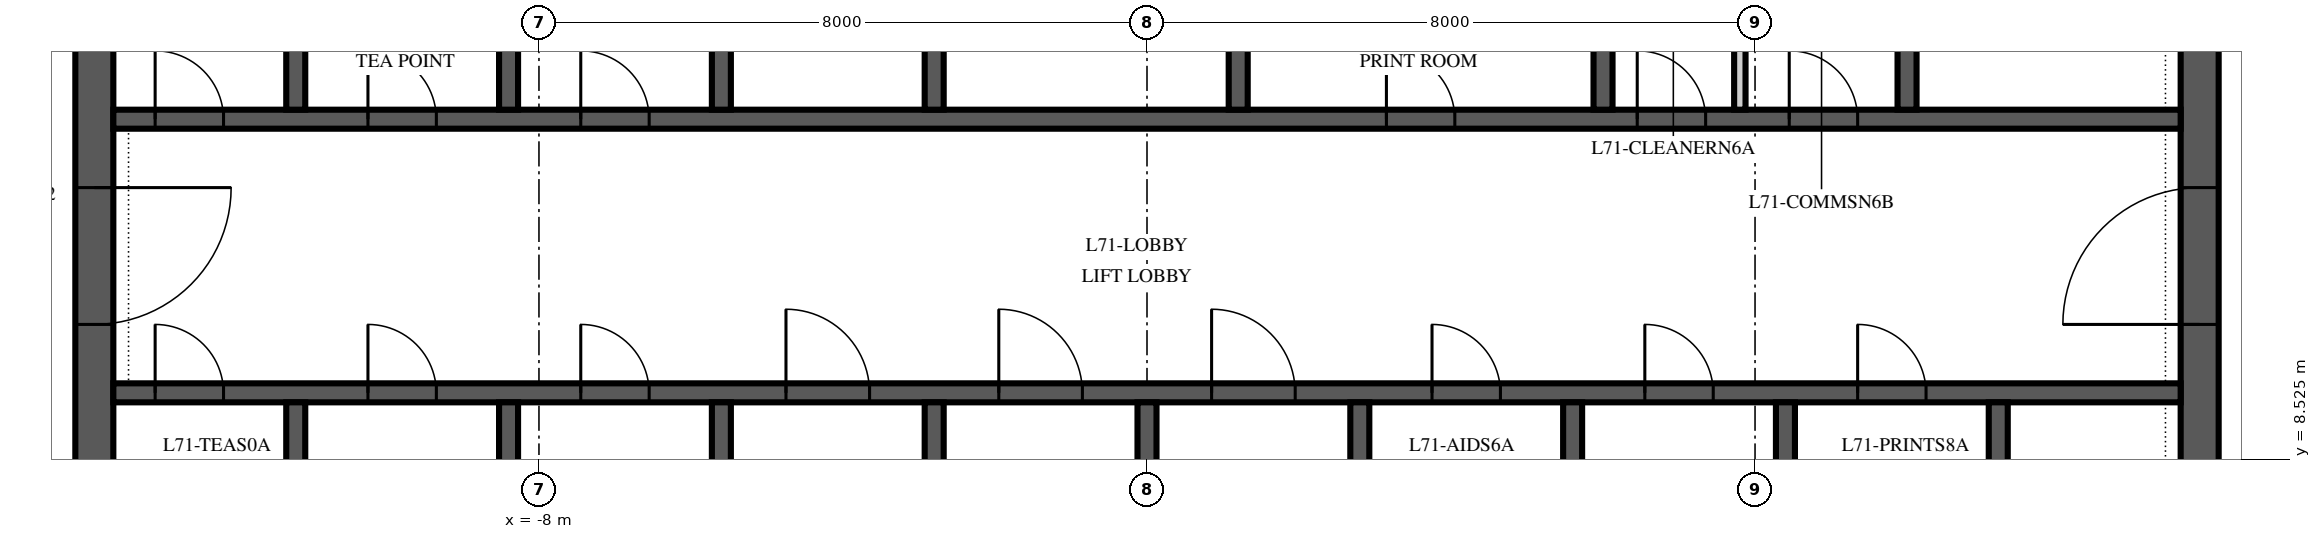
"""IFC4 building model, lengths in metres.
Left out: names, types, materials, properties, quantities, classifications, styles, units other than length and angle.
Written with IfcOpenShell. Run it as: python <this file> out.ifc"""

import sys

from ifc_helpers import new_model, si_unit, direction, frame, frame_2d, origin, place, context, subcontext, project, spatial, polyline, rectangle, outline, extrude, element, fill, save


model = new_model("IFC4")
c1 = context("Model", 3, precision=1e-05, world=origin(), true_north=direction((0.0, 1.0)))
c2 = subcontext(c1, "Body", "Model", "MODEL_VIEW")
j1 = project(units=[si_unit("LENGTHUNIT", "METRE"), si_unit("PLANEANGLEUNIT", "RADIAN")], contexts=[c1])
p1 = place(None, origin())
s1 = spatial("IfcSite", under=j1, at=p1, CompositionType="ELEMENT")
p2 = place(p1, origin())
s2 = spatial("IfcBuilding", under=s1, at=p2, CompositionType="ELEMENT")
p3 = place(p2, frame((0.0, 0.0, 304.0)))
s3 = spatial("IfcBuildingStorey", under=s2, at=p3, CompositionType="ELEMENT", Elevation=304.0)
p4 = place(p3, frame((13.85, 6.15, 0.0), z_axis=(0.0, 0.0, 1.0), x_axis=(0.0, 1.0, 0.0)))
e1 = element("IfcWall", 1, at=p4, inside=s3, PredefinedType="SHEAR", context=c2, shape_type="SweptSolid", body=[
    extrude(outline(polyline([(0.0, -0.25), (17.7, -0.25), (17.7, 0.0), (17.45, 0.0), (17.45, 0.25), (0.25, 0.25), (0.25, 0.0), (0.0, 0.0), (0.0, -0.25)])), origin(), (0.0, 0.0, 1.0), 4.0),
])
p5 = place(p4, frame((4.15, 0.0, 0.0)))
e2 = element("IfcOpeningElement", 2, at=p5, cuts=e1, PredefinedType="OPENING", context=c2, shape_type="SweptSolid", body=[
    extrude(rectangle(XDim=1.8, YDim=2.4, at=frame_2d((0.9, 1.2))), frame((0.0, 0.265, 0.0), z_axis=(0.0, -1.0, 0.0), x_axis=(1.0, 0.0, 0.0)), (0.0, 0.0, 1.0), 0.53),
])
p6 = place(p3, frame((-13.85, 23.85, 0.0), z_axis=(0.0, 0.0, 1.0), x_axis=(0.0, -1.0, 0.0)))
e3 = element("IfcWall", 3, at=p6, inside=s3, PredefinedType="SHEAR", context=c2, shape_type="SweptSolid", body=[
    extrude(outline(polyline([(0.0, -0.25), (17.7, -0.25), (17.7, 0.0), (17.45, 0.0), (17.45, 0.25), (0.25, 0.25), (0.25, 0.0), (0.0, 0.0), (0.0, -0.25)])), origin(), (0.0, 0.0, 1.0), 4.0),
])
p7 = place(p6, frame((11.75, 0.0, 0.0)))
e4 = element("IfcOpeningElement", 4, at=p7, cuts=e3, PredefinedType="OPENING", context=c2, shape_type="SweptSolid", body=[
    extrude(rectangle(XDim=1.8, YDim=2.4, at=frame_2d((0.9, 1.2))), frame((0.0, 0.265, 0.0), z_axis=(0.0, -1.0, 0.0), x_axis=(1.0, 0.0, 0.0)), (0.0, 0.0, 1.0), 0.53),
])
p8 = place(p3, frame((-13.6, 9.4, 0.0), z_axis=(0.0, 0.0, 1.0), x_axis=(1.0, 0.0, 0.0)))
e5 = element("IfcWall", 5, at=p8, inside=s3, PredefinedType="SHEAR", context=c2, shape_type="SweptSolid", body=[
    extrude(rectangle(XDim=27.2, YDim=0.25, at=frame_2d((13.6, 0.0))), origin(), (0.0, 0.0, 1.0), 4.0),
])
p9 = place(p8, frame((8.85, 0.0, 0.0)))
e6 = element("IfcOpeningElement", 6, at=p9, cuts=e5, PredefinedType="OPENING", context=c2, shape_type="SweptSolid", body=[
    extrude(rectangle(XDim=1.1, YDim=2.1, at=frame_2d((0.55, 1.05))), frame((0.0, 0.14, 0.0), z_axis=(0.0, -1.0, 0.0), x_axis=(1.0, 0.0, 0.0)), (0.0, 0.0, 1.0), 0.28),
])
p10 = place(p8, frame((11.65, 0.0, 0.0)))
e7 = element("IfcOpeningElement", 7, at=p10, cuts=e5, PredefinedType="OPENING", context=c2, shape_type="SweptSolid", body=[
    extrude(rectangle(XDim=1.1, YDim=2.1, at=frame_2d((0.55, 1.05))), frame((0.0, 0.14, 0.0), z_axis=(0.0, -1.0, 0.0), x_axis=(1.0, 0.0, 0.0)), (0.0, 0.0, 1.0), 0.28),
])
p11 = place(p8, frame((14.45, 0.0, 0.0)))
e8 = element("IfcOpeningElement", 8, at=p11, cuts=e5, PredefinedType="OPENING", context=c2, shape_type="SweptSolid", body=[
    extrude(rectangle(XDim=1.1, YDim=2.1, at=frame_2d((0.55, 1.05))), frame((0.0, 0.14, 0.0), z_axis=(0.0, -1.0, 0.0), x_axis=(1.0, 0.0, 0.0)), (0.0, 0.0, 1.0), 0.28),
])
p12 = place(p8, frame((0.55, 0.0, 0.0)))
e9 = element("IfcOpeningElement", 9, at=p12, cuts=e5, PredefinedType="OPENING", context=c2, shape_type="SweptSolid", body=[
    extrude(rectangle(XDim=0.9, YDim=2.1, at=frame_2d((0.45, 1.05))), frame((0.0, 0.14, 0.0), z_axis=(0.0, -1.0, 0.0), x_axis=(1.0, 0.0, 0.0)), (0.0, 0.0, 1.0), 0.28),
])
p13 = place(p8, frame((3.35, 0.0, 0.0)))
e10 = element("IfcOpeningElement", 10, at=p13, cuts=e5, PredefinedType="OPENING", context=c2, shape_type="SweptSolid", body=[
    extrude(rectangle(XDim=0.9, YDim=2.1, at=frame_2d((0.45, 1.05))), frame((0.0, 0.14, 0.0), z_axis=(0.0, -1.0, 0.0), x_axis=(1.0, 0.0, 0.0)), (0.0, 0.0, 1.0), 0.28),
])
p14 = place(p8, frame((6.15, 0.0, 0.0)))
e11 = element("IfcOpeningElement", 11, at=p14, cuts=e5, PredefinedType="OPENING", context=c2, shape_type="SweptSolid", body=[
    extrude(rectangle(XDim=0.9, YDim=2.1, at=frame_2d((0.45, 1.05))), frame((0.0, 0.14, 0.0), z_axis=(0.0, -1.0, 0.0), x_axis=(1.0, 0.0, 0.0)), (0.0, 0.0, 1.0), 0.28),
])
p15 = place(p8, frame((17.35, 0.0, 0.0)))
e12 = element("IfcOpeningElement", 12, at=p15, cuts=e5, PredefinedType="OPENING", context=c2, shape_type="SweptSolid", body=[
    extrude(rectangle(XDim=0.9, YDim=2.1, at=frame_2d((0.45, 1.05))), frame((0.0, 0.14, 0.0), z_axis=(0.0, -1.0, 0.0), x_axis=(1.0, 0.0, 0.0)), (0.0, 0.0, 1.0), 0.28),
])
p16 = place(p8, frame((20.15, 0.0, 0.0)))
e13 = element("IfcOpeningElement", 13, at=p16, cuts=e5, PredefinedType="OPENING", context=c2, shape_type="SweptSolid", body=[
    extrude(rectangle(XDim=0.9, YDim=2.1, at=frame_2d((0.45, 1.05))), frame((0.0, 0.14, 0.0), z_axis=(0.0, -1.0, 0.0), x_axis=(1.0, 0.0, 0.0)), (0.0, 0.0, 1.0), 0.28),
])
p17 = place(p8, frame((22.95, 0.0, 0.0)))
e14 = element("IfcOpeningElement", 14, at=p17, cuts=e5, PredefinedType="OPENING", context=c2, shape_type="SweptSolid", body=[
    extrude(rectangle(XDim=0.9, YDim=2.1, at=frame_2d((0.45, 1.05))), frame((0.0, 0.14, 0.0), z_axis=(0.0, -1.0, 0.0), x_axis=(1.0, 0.0, 0.0)), (0.0, 0.0, 1.0), 0.28),
])
p18 = place(p3, frame((-13.6, 13.0, 0.0), z_axis=(0.0, 0.0, 1.0), x_axis=(1.0, 0.0, 0.0)))
e15 = element("IfcWall", 15, at=p18, inside=s3, PredefinedType="SHEAR", context=c2, shape_type="SweptSolid", body=[
    extrude(rectangle(XDim=27.2, YDim=0.25, at=frame_2d((13.6, 0.0))), origin(), (0.0, 0.0, 1.0), 4.0),
])
p19 = place(p18, frame((16.75, 0.0, 0.0)))
e16 = element("IfcOpeningElement", 16, at=p19, cuts=e15, PredefinedType="OPENING", context=c2, shape_type="SweptSolid", body=[
    extrude(rectangle(XDim=0.9, YDim=2.1, at=frame_2d((0.45, 1.05))), frame((0.0, 0.14, 0.0), z_axis=(0.0, -1.0, 0.0), x_axis=(1.0, 0.0, 0.0)), (0.0, 0.0, 1.0), 0.28),
])
p20 = place(p18, frame((20.05, 0.0, 0.0)))
e17 = element("IfcOpeningElement", 17, at=p20, cuts=e15, PredefinedType="OPENING", context=c2, shape_type="SweptSolid", body=[
    extrude(rectangle(XDim=0.9, YDim=2.1, at=frame_2d((0.45, 1.05))), frame((0.0, 0.14, 0.0), z_axis=(0.0, -1.0, 0.0), x_axis=(1.0, 0.0, 0.0)), (0.0, 0.0, 1.0), 0.28),
])
p21 = place(p18, frame((22.05, 0.0, 0.0)))
e18 = element("IfcOpeningElement", 18, at=p21, cuts=e15, PredefinedType="OPENING", context=c2, shape_type="SweptSolid", body=[
    extrude(rectangle(XDim=0.9, YDim=2.1, at=frame_2d((0.45, 1.05))), frame((0.0, 0.14, 0.0), z_axis=(0.0, -1.0, 0.0), x_axis=(1.0, 0.0, 0.0)), (0.0, 0.0, 1.0), 0.28),
])
p22 = place(p18, frame((0.55, 0.0, 0.0)))
e19 = element("IfcOpeningElement", 19, at=p22, cuts=e15, PredefinedType="OPENING", context=c2, shape_type="SweptSolid", body=[
    extrude(rectangle(XDim=0.9, YDim=2.1, at=frame_2d((0.45, 1.05))), frame((0.0, 0.14, 0.0), z_axis=(0.0, -1.0, 0.0), x_axis=(1.0, 0.0, 0.0)), (0.0, 0.0, 1.0), 0.28),
])
p23 = place(p18, frame((3.35, 0.0, 0.0)))
e20 = element("IfcOpeningElement", 20, at=p23, cuts=e15, PredefinedType="OPENING", context=c2, shape_type="SweptSolid", body=[
    extrude(rectangle(XDim=0.9, YDim=2.1, at=frame_2d((0.45, 1.05))), frame((0.0, 0.14, 0.0), z_axis=(0.0, -1.0, 0.0), x_axis=(1.0, 0.0, 0.0)), (0.0, 0.0, 1.0), 0.28),
])
p24 = place(p18, frame((6.15, 0.0, 0.0)))
e21 = element("IfcOpeningElement", 21, at=p24, cuts=e15, PredefinedType="OPENING", context=c2, shape_type="SweptSolid", body=[
    extrude(rectangle(XDim=0.9, YDim=2.1, at=frame_2d((0.45, 1.05))), frame((0.0, 0.14, 0.0), z_axis=(0.0, -1.0, 0.0), x_axis=(1.0, 0.0, 0.0)), (0.0, 0.0, 1.0), 0.28),
])
for number, where, z_axis, x_axis in (
    (22, (-11.2, 6.4, 0.0), (0.0, 0.0, 1.0), (0.0, 1.0, 0.0)),
    (23, (-8.4, 6.4, 0.0), (0.0, 0.0, 1.0), (0.0, 1.0, 0.0)),
    (24, (-5.6, 6.4, 0.0), (0.0, 0.0, 1.0), (0.0, 1.0, 0.0)),
    (25, (-2.8, 6.4, 0.0), (0.0, 0.0, 1.0), (0.0, 1.0, 0.0)),
    (26, (0.0, 6.4, 0.0), (0.0, 0.0, 1.0), (0.0, 1.0, 0.0)),
    (27, (2.8, 6.4, 0.0), (0.0, 0.0, 1.0), (0.0, 1.0, 0.0)),
    (28, (5.6, 6.4, 0.0), (0.0, 0.0, 1.0), (0.0, 1.0, 0.0)),
    (29, (8.4, 6.4, 0.0), (0.0, 0.0, 1.0), (0.0, 1.0, 0.0)),
    (30, (11.2, 6.4, 0.0), (0.0, 0.0, 1.0), (0.0, 1.0, 0.0)),
):
    element("IfcWall", number, at=place(p3, frame(where, z_axis=z_axis, x_axis=x_axis)), inside=s3, PredefinedType="SHEAR", context=c2, shape_type="SweptSolid", body=[
        extrude(rectangle(XDim=2.875, YDim=0.25, at=frame_2d((1.438, 0.0))), origin(), (0.0, 0.0, 1.0), 4.0),
    ])
for number, where, z_axis, x_axis in (
    (31, (-11.2, 13.125, 0.0), (0.0, 0.0, 1.0), (0.0, 1.0, 0.0)),
    (32, (-8.4, 13.125, 0.0), (0.0, 0.0, 1.0), (0.0, 1.0, 0.0)),
    (33, (-5.6, 13.125, 0.0), (0.0, 0.0, 1.0), (0.0, 1.0, 0.0)),
    (34, (-2.8, 13.125, 0.0), (0.0, 0.0, 1.0), (0.0, 1.0, 0.0)),
    (35, (1.2, 13.125, 0.0), (0.0, 0.0, 1.0), (0.0, 1.0, 0.0)),
    (36, (6.0, 13.125, 0.0), (0.0, 0.0, 1.0), (0.0, 1.0, 0.0)),
    (37, (10.0, 13.125, 0.0), (0.0, 0.0, 1.0), (0.0, 1.0, 0.0)),
):
    element("IfcWall", number, at=place(p3, frame(where, z_axis=z_axis, x_axis=x_axis)), inside=s3, PredefinedType="SHEAR", context=c2, shape_type="SweptSolid", body=[
        extrude(rectangle(XDim=2.75, YDim=0.25, at=frame_2d((1.375, 0.0))), origin(), (0.0, 0.0, 1.0), 4.0),
    ])
p25 = place(p3, frame((7.8, 13.125, 0.0), z_axis=(0.0, 0.0, 1.0), x_axis=(0.0, 1.0, 0.0)))
e38 = element("IfcWall", 38, at=p25, inside=s3, PredefinedType="PARTITIONING", context=c2, shape_type="SweptSolid", body=[
    extrude(rectangle(XDim=2.75, YDim=0.15, at=frame_2d((1.375, 0.0))), origin(), (0.0, 0.0, 1.0), 3.85),
])
p26 = place(p5, origin())
e39 = element("IfcDoor", 39, at=p26, inside=s3, OperationType="DOUBLE_DOOR_SINGLE_SWING", PredefinedType="DOOR", context=c2, shape_type="SweptSolid", body=[
    extrude(rectangle(XDim=1.8, YDim=2.4, at=frame_2d((0.9, 1.2))), frame((0.0, 0.25, 0.0), z_axis=(0.0, -1.0, 0.0), x_axis=(1.0, 0.0, 0.0)), (0.0, 0.0, 1.0), 0.5),
])
fill(e2, e39)
p27 = place(p7, origin())
e40 = element("IfcDoor", 40, at=p27, inside=s3, OperationType="DOUBLE_DOOR_SINGLE_SWING", PredefinedType="DOOR", context=c2, shape_type="SweptSolid", body=[
    extrude(rectangle(XDim=1.8, YDim=2.4, at=frame_2d((0.9, 1.2))), frame((0.0, 0.25, 0.0), z_axis=(0.0, -1.0, 0.0), x_axis=(1.0, 0.0, 0.0)), (0.0, 0.0, 1.0), 0.5),
])
fill(e4, e40)
p28 = place(p9, origin())
e41 = element("IfcDoor", 41, at=p28, inside=s3, OperationType="SLIDING_TO_LEFT", PredefinedType="DOOR", context=c2, shape_type="SweptSolid", body=[
    extrude(rectangle(XDim=1.1, YDim=2.1, at=frame_2d((0.55, 1.05))), frame((0.0, 0.125, 0.0), z_axis=(0.0, -1.0, 0.0), x_axis=(1.0, 0.0, 0.0)), (0.0, 0.0, 1.0), 0.25),
])
fill(e6, e41)
p29 = place(p10, origin())
e42 = element("IfcDoor", 42, at=p29, inside=s3, OperationType="SLIDING_TO_LEFT", PredefinedType="DOOR", context=c2, shape_type="SweptSolid", body=[
    extrude(rectangle(XDim=1.1, YDim=2.1, at=frame_2d((0.55, 1.05))), frame((0.0, 0.125, 0.0), z_axis=(0.0, -1.0, 0.0), x_axis=(1.0, 0.0, 0.0)), (0.0, 0.0, 1.0), 0.25),
])
fill(e7, e42)
p30 = place(p11, origin())
e43 = element("IfcDoor", 43, at=p30, inside=s3, OperationType="SLIDING_TO_LEFT", PredefinedType="DOOR", context=c2, shape_type="SweptSolid", body=[
    extrude(rectangle(XDim=1.1, YDim=2.1, at=frame_2d((0.55, 1.05))), frame((0.0, 0.125, 0.0), z_axis=(0.0, -1.0, 0.0), x_axis=(1.0, 0.0, 0.0)), (0.0, 0.0, 1.0), 0.25),
])
fill(e8, e43)
p31 = place(p19, origin())
e44 = element("IfcDoor", 44, at=p31, inside=s3, OperationType="SINGLE_SWING_LEFT", PredefinedType="DOOR", context=c2, shape_type="SweptSolid", body=[
    extrude(rectangle(XDim=0.9, YDim=2.1, at=frame_2d((0.45, 1.05))), frame((0.0, 0.125, 0.0), z_axis=(0.0, -1.0, 0.0), x_axis=(1.0, 0.0, 0.0)), (0.0, 0.0, 1.0), 0.25),
])
fill(e16, e44)
p32 = place(p20, origin())
e45 = element("IfcDoor", 45, at=p32, inside=s3, OperationType="SINGLE_SWING_LEFT", PredefinedType="DOOR", context=c2, shape_type="SweptSolid", body=[
    extrude(rectangle(XDim=0.9, YDim=2.1, at=frame_2d((0.45, 1.05))), frame((0.0, 0.125, 0.0), z_axis=(0.0, -1.0, 0.0), x_axis=(1.0, 0.0, 0.0)), (0.0, 0.0, 1.0), 0.25),
])
fill(e17, e45)
p33 = place(p21, origin())
e46 = element("IfcDoor", 46, at=p33, inside=s3, OperationType="SINGLE_SWING_LEFT", PredefinedType="DOOR", context=c2, shape_type="SweptSolid", body=[
    extrude(rectangle(XDim=0.9, YDim=2.1, at=frame_2d((0.45, 1.05))), frame((0.0, 0.125, 0.0), z_axis=(0.0, -1.0, 0.0), x_axis=(1.0, 0.0, 0.0)), (0.0, 0.0, 1.0), 0.25),
])
fill(e18, e46)
p34 = place(p22, origin())
e47 = element("IfcDoor", 47, at=p34, inside=s3, OperationType="SINGLE_SWING_LEFT", PredefinedType="DOOR", context=c2, shape_type="SweptSolid", body=[
    extrude(rectangle(XDim=0.9, YDim=2.1, at=frame_2d((0.45, 1.05))), frame((0.0, 0.125, 0.0), z_axis=(0.0, -1.0, 0.0), x_axis=(1.0, 0.0, 0.0)), (0.0, 0.0, 1.0), 0.25),
])
fill(e19, e47)
p35 = place(p23, origin())
e48 = element("IfcDoor", 48, at=p35, inside=s3, OperationType="SINGLE_SWING_LEFT", PredefinedType="DOOR", context=c2, shape_type="SweptSolid", body=[
    extrude(rectangle(XDim=0.9, YDim=2.1, at=frame_2d((0.45, 1.05))), frame((0.0, 0.125, 0.0), z_axis=(0.0, -1.0, 0.0), x_axis=(1.0, 0.0, 0.0)), (0.0, 0.0, 1.0), 0.25),
])
fill(e20, e48)
p36 = place(p24, origin())
e49 = element("IfcDoor", 49, at=p36, inside=s3, OperationType="SINGLE_SWING_LEFT", PredefinedType="DOOR", context=c2, shape_type="SweptSolid", body=[
    extrude(rectangle(XDim=0.9, YDim=2.1, at=frame_2d((0.45, 1.05))), frame((0.0, 0.125, 0.0), z_axis=(0.0, -1.0, 0.0), x_axis=(1.0, 0.0, 0.0)), (0.0, 0.0, 1.0), 0.25),
])
fill(e21, e49)
p37 = place(p12, origin())
e50 = element("IfcDoor", 50, at=p37, inside=s3, OperationType="SINGLE_SWING_LEFT", PredefinedType="DOOR", context=c2, shape_type="SweptSolid", body=[
    extrude(rectangle(XDim=0.9, YDim=2.1, at=frame_2d((0.45, 1.05))), frame((0.0, 0.125, 0.0), z_axis=(0.0, -1.0, 0.0), x_axis=(1.0, 0.0, 0.0)), (0.0, 0.0, 1.0), 0.25),
])
fill(e9, e50)
p38 = place(p13, origin())
e51 = element("IfcDoor", 51, at=p38, inside=s3, OperationType="SINGLE_SWING_LEFT", PredefinedType="DOOR", context=c2, shape_type="SweptSolid", body=[
    extrude(rectangle(XDim=0.9, YDim=2.1, at=frame_2d((0.45, 1.05))), frame((0.0, 0.125, 0.0), z_axis=(0.0, -1.0, 0.0), x_axis=(1.0, 0.0, 0.0)), (0.0, 0.0, 1.0), 0.25),
])
fill(e10, e51)
p39 = place(p14, origin())
e52 = element("IfcDoor", 52, at=p39, inside=s3, OperationType="SINGLE_SWING_LEFT", PredefinedType="DOOR", context=c2, shape_type="SweptSolid", body=[
    extrude(rectangle(XDim=0.9, YDim=2.1, at=frame_2d((0.45, 1.05))), frame((0.0, 0.125, 0.0), z_axis=(0.0, -1.0, 0.0), x_axis=(1.0, 0.0, 0.0)), (0.0, 0.0, 1.0), 0.25),
])
fill(e11, e52)
p40 = place(p15, origin())
e53 = element("IfcDoor", 53, at=p40, inside=s3, OperationType="SINGLE_SWING_LEFT", PredefinedType="DOOR", context=c2, shape_type="SweptSolid", body=[
    extrude(rectangle(XDim=0.9, YDim=2.1, at=frame_2d((0.45, 1.05))), frame((0.0, 0.125, 0.0), z_axis=(0.0, -1.0, 0.0), x_axis=(1.0, 0.0, 0.0)), (0.0, 0.0, 1.0), 0.25),
])
fill(e12, e53)
p41 = place(p16, origin())
e54 = element("IfcDoor", 54, at=p41, inside=s3, OperationType="SINGLE_SWING_LEFT", PredefinedType="DOOR", context=c2, shape_type="SweptSolid", body=[
    extrude(rectangle(XDim=0.9, YDim=2.1, at=frame_2d((0.45, 1.05))), frame((0.0, 0.125, 0.0), z_axis=(0.0, -1.0, 0.0), x_axis=(1.0, 0.0, 0.0)), (0.0, 0.0, 1.0), 0.25),
])
fill(e13, e54)
p42 = place(p17, origin())
e55 = element("IfcDoor", 55, at=p42, inside=s3, OperationType="SINGLE_SWING_LEFT", PredefinedType="DOOR", context=c2, shape_type="SweptSolid", body=[
    extrude(rectangle(XDim=0.9, YDim=2.1, at=frame_2d((0.45, 1.05))), frame((0.0, 0.125, 0.0), z_axis=(0.0, -1.0, 0.0), x_axis=(1.0, 0.0, 0.0)), (0.0, 0.0, 1.0), 0.25),
])
fill(e14, e55)
save(model, sys.argv[1])
